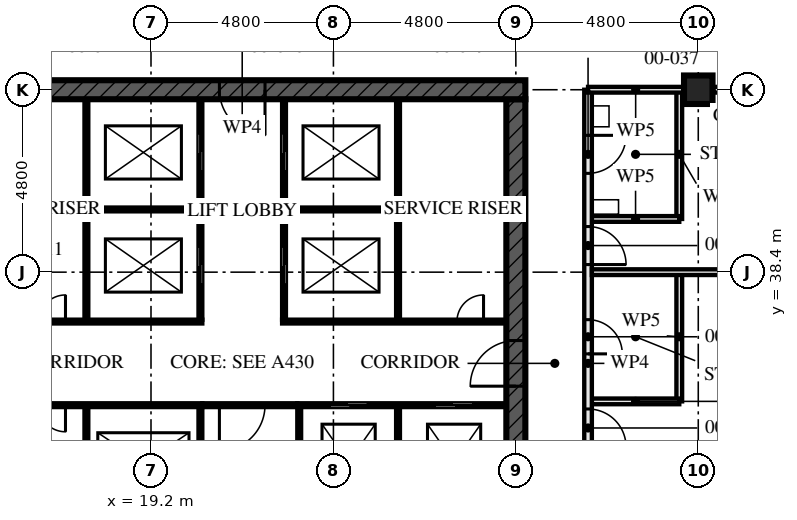
"""IFC4 building model, lengths in metres.
Left out: names, types, materials, properties, quantities, classifications, styles, units other than length and angle.
Written with IfcOpenShell. Run it as: python <this file> out.ifc"""

import sys

from ifc_helpers import new_model, si_unit, direction, frame, frame_2d, origin, origin_2d, place, context, subcontext, project, spatial, rectangle, hollow_rectangle, extrude, element, fill, save


model = new_model("IFC4")
c1 = context("Model", 3, precision=1e-05, world=origin(), true_north=direction((0.0, 1.0)))
c2 = subcontext(c1, "Body", "Model", "MODEL_VIEW")
j1 = project(units=[si_unit("LENGTHUNIT", "METRE"), si_unit("PLANEANGLEUNIT", "RADIAN")], contexts=[c1])
p1 = place(None, origin())
s1 = spatial("IfcSite", under=j1, at=p1, CompositionType="ELEMENT")
p2 = place(p1, origin())
s2 = spatial("IfcBuilding", under=s1, at=p2, CompositionType="ELEMENT")
p3 = place(p2, origin())
s3 = spatial("IfcBuildingStorey", under=s2, at=p3, CompositionType="ELEMENT", Elevation=0.0)
p4 = place(p3, frame((33.6, 43.2, 0.0), z_axis=(0.0, 0.0, 1.0), x_axis=(0.0, 1.0, 0.0)))
e1 = element("IfcColumn", 1, at=p4, inside=s3, PredefinedType="COLUMN", context=c2, shape_type="SweptSolid", body=[
    extrude(hollow_rectangle(XDim=0.75, YDim=0.75, WallThickness=0.08, at=origin_2d()), origin(), (0.0, 0.0, 1.0), 4.5),
])
p5 = place(p3, frame((29.05, 43.2, -1.8), z_axis=(0.0, 0.0, 1.0), x_axis=(-1.0, 0.0, 0.0)))
e2 = element("IfcWall", 2, at=p5, inside=s3, PredefinedType="SHEAR", context=c2, shape_type="SweptSolid", body=[
    extrude(rectangle(XDim=14.9, YDim=0.5, at=frame_2d((7.45, 0.0))), origin(), (0.0, 0.0, 1.0), 6.13),
])
p6 = place(p5, frame((6.85, 0.0, 1.8)))
e3 = element("IfcOpeningElement", 3, at=p6, cuts=e2, PredefinedType="OPENING", context=c2, shape_type="SweptSolid", body=[
    extrude(rectangle(XDim=1.2, YDim=2.1, at=frame_2d((0.6, 1.05))), frame((0.0, 0.26, 0.0), z_axis=(0.0, -1.0, 0.0), x_axis=(1.0, 0.0, 0.0)), (0.0, 0.0, 1.0), 0.521),
])
p7 = place(p3, frame((28.8, 29.05, -1.8), z_axis=(0.0, 0.0, 1.0), x_axis=(0.0, 1.0, 0.0)))
e4 = element("IfcWall", 4, at=p7, inside=s3, PredefinedType="SHEAR", context=c2, shape_type="SweptSolid", body=[
    extrude(rectangle(XDim=13.9, YDim=0.5, at=frame_2d((6.95, 0.0))), origin(), (0.0, 0.0, 1.0), 6.13),
])
p8 = place(p7, frame((6.35, 0.0, 1.8)))
e5 = element("IfcOpeningElement", 5, at=p8, cuts=e4, PredefinedType="OPENING", context=c2, shape_type="SweptSolid", body=[
    extrude(rectangle(XDim=1.2, YDim=2.1, at=frame_2d((0.6, 1.05))), frame((0.0, 0.26, 0.0), z_axis=(0.0, -1.0, 0.0), x_axis=(1.0, 0.0, 0.0)), (0.0, 0.0, 1.0), 0.521),
])
p9 = place(p3, frame((33.1, 35.0, 0.0), z_axis=(0.0, 0.0, 1.0), x_axis=(-1.0, 0.0, 0.0)))
e6 = element("IfcWall", 6, at=p9, inside=s3, PredefinedType="PARTITIONING", context=c2, shape_type="SweptSolid", body=[
    extrude(rectangle(XDim=2.3, YDim=0.15, at=frame_2d((1.15, 0.0))), origin(), (0.0, 0.0, 1.0), 4.33),
])
p10 = place(p3, frame((33.1, 35.0, 0.0), z_axis=(0.0, 0.0, 1.0), x_axis=(0.0, 1.0, 0.0)))
e7 = element("IfcWall", 7, at=p10, inside=s3, PredefinedType="PARTITIONING", context=c2, shape_type="SweptSolid", body=[
    extrude(rectangle(XDim=3.4, YDim=0.15, at=frame_2d((1.7, 0.0))), origin(), (0.0, 0.0, 1.0), 4.33),
])
p11 = place(p3, frame((33.1, 39.8, 0.0), z_axis=(0.0, 0.0, 1.0), x_axis=(-1.0, 0.0, 0.0)))
e8 = element("IfcWall", 8, at=p11, inside=s3, PredefinedType="PARTITIONING", context=c2, shape_type="SweptSolid", body=[
    extrude(rectangle(XDim=2.3, YDim=0.15, at=frame_2d((1.15, 0.0))), origin(), (0.0, 0.0, 1.0), 4.33),
])
p12 = place(p3, frame((33.1, 39.8, 0.0), z_axis=(0.0, 0.0, 1.0), x_axis=(0.0, 1.0, 0.0)))
e9 = element("IfcWall", 9, at=p12, inside=s3, PredefinedType="PARTITIONING", context=c2, shape_type="SweptSolid", body=[
    extrude(rectangle(XDim=3.4, YDim=0.15, at=frame_2d((1.7, 0.0))), origin(), (0.0, 0.0, 1.0), 4.33),
])
p13 = place(p3, frame((42.805, 38.4, 0.0), z_axis=(0.0, 0.0, 1.0), x_axis=(-1.0, 0.0, 0.0)))
e10 = element("IfcWall", 10, at=p13, inside=s3, PredefinedType="PARTITIONING", context=c2, shape_type="SweptSolid", body=[
    extrude(rectangle(XDim=12.005, YDim=0.15, at=frame_2d((6.002, 0.0))), origin(), (0.0, 0.0, 1.0), 3.55),
])
p14 = place(p3, frame((30.7, 28.8, 0.0), z_axis=(0.0, 0.0, 1.0), x_axis=(0.0, 1.0, 0.0)))
e11 = element("IfcWall", 11, at=p14, inside=s3, PredefinedType="PARTITIONING", context=c2, shape_type="SweptSolid", body=[
    extrude(rectangle(XDim=14.4, YDim=0.2, at=frame_2d((7.2, 0.0))), origin(), (0.0, 0.0, 1.0), 3.55),
])
p15 = place(p14, frame((3.462, 0.0, 0.0)))
e12 = element("IfcOpeningElement", 12, at=p15, cuts=e11, PredefinedType="OPENING", context=c2, shape_type="SweptSolid", body=[
    extrude(rectangle(XDim=1.2, YDim=2.4, at=frame_2d((0.6, 1.2))), frame((0.0, 0.111, 0.0), z_axis=(0.0, -1.0, 0.0), x_axis=(1.0, 0.0, 0.0)), (0.0, 0.0, 1.0), 0.221),
])
p16 = place(p14, frame((5.0, 0.0, 0.0)))
e13 = element("IfcOpeningElement", 13, at=p16, cuts=e11, PredefinedType="OPENING", context=c2, shape_type="SweptSolid", body=[
    extrude(rectangle(XDim=1.0, YDim=2.4, at=frame_2d((0.5, 1.2))), frame((0.0, 0.111, 0.0), z_axis=(0.0, -1.0, 0.0), x_axis=(1.0, 0.0, 0.0)), (0.0, 0.0, 1.0), 0.221),
])
p17 = place(p14, frame((9.8, 0.0, 0.0)))
e14 = element("IfcOpeningElement", 14, at=p17, cuts=e11, PredefinedType="OPENING", context=c2, shape_type="SweptSolid", body=[
    extrude(rectangle(XDim=1.0, YDim=2.4, at=frame_2d((0.5, 1.2))), frame((0.0, 0.111, 0.0), z_axis=(0.0, -1.0, 0.0), x_axis=(1.0, 0.0, 0.0)), (0.0, 0.0, 1.0), 0.221),
])
p18 = place(p14, frame((7.45, 0.0, 0.0)))
e15 = element("IfcOpeningElement", 15, at=p18, cuts=e11, PredefinedType="OPENING", context=c2, shape_type="SweptSolid", body=[
    extrude(rectangle(XDim=0.9, YDim=2.1, at=frame_2d((0.45, 1.05))), frame((0.0, 0.111, 0.0), z_axis=(0.0, -1.0, 0.0), x_axis=(1.0, 0.0, 0.0)), (0.0, 0.0, 1.0), 0.221),
])
p19 = place(p14, frame((12.2, 0.0, 0.0)))
e16 = element("IfcOpeningElement", 16, at=p19, cuts=e11, PredefinedType="OPENING", context=c2, shape_type="SweptSolid", body=[
    extrude(rectangle(XDim=1.0, YDim=2.1, at=frame_2d((0.5, 1.05))), frame((0.0, 0.111, 0.0), z_axis=(0.0, -1.0, 0.0), x_axis=(1.0, 0.0, 0.0)), (0.0, 0.0, 1.0), 0.221),
])
p20 = place(p3, frame((20.5, 29.05, -1.8), z_axis=(0.0, 0.0, 1.0), x_axis=(0.0, 1.0, 0.0)))
e17 = element("IfcWall", 17, at=p20, inside=s3, PredefinedType="SOLIDWALL", context=c2, shape_type="SweptSolid", body=[
    extrude(rectangle(XDim=5.8, YDim=0.1, at=frame_2d((2.9, 0.0))), origin(), (0.0, 0.0, 1.0), 6.13),
])
p21 = place(p20, frame((0.8, 0.0, 1.8)))
e18 = element("IfcOpeningElement", 18, at=p21, cuts=e17, PredefinedType="OPENING", context=c2, shape_type="SweptSolid", body=[
    extrude(rectangle(XDim=1.1, YDim=2.3, at=frame_2d((0.55, 1.15))), frame((0.0, 0.061, 0.0), z_axis=(0.0, -1.0, 0.0), x_axis=(1.0, 0.0, 0.0)), (0.0, 0.0, 1.0), 0.121),
])
p22 = place(p20, frame((3.775, 0.0, 1.8)))
e19 = element("IfcOpeningElement", 19, at=p22, cuts=e17, PredefinedType="OPENING", context=c2, shape_type="SweptSolid", body=[
    extrude(rectangle(XDim=1.1, YDim=2.3, at=frame_2d((0.55, 1.15))), frame((0.0, 0.061, 0.0), z_axis=(0.0, -1.0, 0.0), x_axis=(1.0, 0.0, 0.0)), (0.0, 0.0, 1.0), 0.121),
])
p23 = place(p3, frame((20.5, 37.15, -1.8), z_axis=(0.0, 0.0, 1.0), x_axis=(0.0, 1.0, 0.0)))
e20 = element("IfcWall", 20, at=p23, inside=s3, PredefinedType="SOLIDWALL", context=c2, shape_type="SweptSolid", body=[
    extrude(rectangle(XDim=5.8, YDim=0.1, at=frame_2d((2.9, 0.0))), origin(), (0.0, 0.0, 1.0), 6.13),
])
p24 = place(p23, frame((0.925, 0.0, 1.8)))
e21 = element("IfcOpeningElement", 21, at=p24, cuts=e20, PredefinedType="OPENING", context=c2, shape_type="SweptSolid", body=[
    extrude(rectangle(XDim=1.0, YDim=2.1, at=frame_2d((0.5, 1.05))), frame((0.0, 0.061, 0.0), z_axis=(0.0, -1.0, 0.0), x_axis=(1.0, 0.0, 0.0)), (0.0, 0.0, 1.0), 0.121),
])
p25 = place(p23, frame((3.9, 0.0, 1.8)))
e22 = element("IfcOpeningElement", 22, at=p25, cuts=e20, PredefinedType="OPENING", context=c2, shape_type="SweptSolid", body=[
    extrude(rectangle(XDim=1.0, YDim=2.1, at=frame_2d((0.5, 1.05))), frame((0.0, 0.061, 0.0), z_axis=(0.0, -1.0, 0.0), x_axis=(1.0, 0.0, 0.0)), (0.0, 0.0, 1.0), 0.121),
])
p26 = place(p3, frame((22.7, 37.15, -1.8), z_axis=(0.0, 0.0, 1.0), x_axis=(0.0, 1.0, 0.0)))
e23 = element("IfcWall", 23, at=p26, inside=s3, PredefinedType="SOLIDWALL", context=c2, shape_type="SweptSolid", body=[
    extrude(rectangle(XDim=5.8, YDim=0.1, at=frame_2d((2.9, 0.0))), origin(), (0.0, 0.0, 1.0), 6.13),
])
p27 = place(p26, frame((0.925, 0.0, 1.8)))
e24 = element("IfcOpeningElement", 24, at=p27, cuts=e23, PredefinedType="OPENING", context=c2, shape_type="SweptSolid", body=[
    extrude(rectangle(XDim=1.0, YDim=2.1, at=frame_2d((0.5, 1.05))), frame((0.0, 0.061, 0.0), z_axis=(0.0, -1.0, 0.0), x_axis=(1.0, 0.0, 0.0)), (0.0, 0.0, 1.0), 0.121),
])
p28 = place(p26, frame((3.9, 0.0, 1.8)))
e25 = element("IfcOpeningElement", 25, at=p28, cuts=e23, PredefinedType="OPENING", context=c2, shape_type="SweptSolid", body=[
    extrude(rectangle(XDim=1.0, YDim=2.1, at=frame_2d((0.5, 1.05))), frame((0.0, 0.061, 0.0), z_axis=(0.0, -1.0, 0.0), x_axis=(1.0, 0.0, 0.0)), (0.0, 0.0, 1.0), 0.121),
])
p29 = place(p3, frame((23.1, 29.05, -1.8), z_axis=(0.0, 0.0, 1.0), x_axis=(0.0, 1.0, 0.0)))
e26 = element("IfcWall", 26, at=p29, inside=s3, PredefinedType="SOLIDWALL", context=c2, shape_type="SweptSolid", body=[
    extrude(rectangle(XDim=5.8, YDim=0.1, at=frame_2d((2.9, 0.0))), origin(), (0.0, 0.0, 1.0), 6.13),
])
p30 = place(p29, frame((1.0, 0.0, 1.8)))
e27 = element("IfcOpeningElement", 27, at=p30, cuts=e26, PredefinedType="OPENING", context=c2, shape_type="SweptSolid", body=[
    extrude(rectangle(XDim=0.7, YDim=2.1, at=frame_2d((0.35, 1.05))), frame((0.0, 0.061, 0.0), z_axis=(0.0, -1.0, 0.0), x_axis=(1.0, 0.0, 0.0)), (0.0, 0.0, 1.0), 0.121),
])
p31 = place(p3, frame((14.65, 34.9, -1.8), z_axis=(0.0, 0.0, 1.0), x_axis=(1.0, 0.0, 0.0)))
e28 = element("IfcWall", 28, at=p31, inside=s3, PredefinedType="SOLIDWALL", context=c2, shape_type="SweptSolid", body=[
    extrude(rectangle(XDim=5.9, YDim=0.1, at=frame_2d((2.95, 0.0))), origin(), (0.0, 0.0, 1.0), 6.13),
])
p32 = place(p31, frame((1.6, 0.0, 1.8)))
e29 = element("IfcOpeningElement", 29, at=p32, cuts=e28, PredefinedType="OPENING", context=c2, shape_type="SweptSolid", body=[
    extrude(rectangle(XDim=0.7, YDim=2.1, at=frame_2d((0.35, 1.05))), frame((0.0, 0.061, 0.0), z_axis=(0.0, -1.0, 0.0), x_axis=(1.0, 0.0, 0.0)), (0.0, 0.0, 1.0), 0.121),
])
p33 = place(p3, frame((23.05, 34.9, -1.8), z_axis=(0.0, 0.0, 1.0), x_axis=(1.0, 0.0, 0.0)))
e30 = element("IfcWall", 30, at=p33, inside=s3, PredefinedType="SOLIDWALL", context=c2, shape_type="SweptSolid", body=[
    extrude(rectangle(XDim=5.5, YDim=0.1, at=frame_2d((2.75, 0.0))), origin(), (0.0, 0.0, 1.0), 6.13),
])
p34 = place(p33, frame((0.85, 0.0, 1.8)))
e31 = element("IfcOpeningElement", 31, at=p34, cuts=e30, PredefinedType="OPENING", context=c2, shape_type="SweptSolid", body=[
    extrude(rectangle(XDim=1.0, YDim=2.1, at=frame_2d((0.5, 1.05))), frame((0.0, 0.061, 0.0), z_axis=(0.0, -1.0, 0.0), x_axis=(1.0, 0.0, 0.0)), (0.0, 0.0, 1.0), 0.121),
])
p35 = place(p33, frame((3.625, 0.0, 1.8)))
e32 = element("IfcOpeningElement", 32, at=p35, cuts=e30, PredefinedType="OPENING", context=c2, shape_type="SweptSolid", body=[
    extrude(rectangle(XDim=1.0, YDim=2.1, at=frame_2d((0.5, 1.05))), frame((0.0, 0.061, 0.0), z_axis=(0.0, -1.0, 0.0), x_axis=(1.0, 0.0, 0.0)), (0.0, 0.0, 1.0), 0.121),
])
p36 = place(p3, frame((14.65, 37.1, -1.8), z_axis=(0.0, 0.0, 1.0), x_axis=(1.0, 0.0, 0.0)))
e33 = element("IfcWall", 33, at=p36, inside=s3, PredefinedType="SOLIDWALL", context=c2, shape_type="SweptSolid", body=[
    extrude(rectangle(XDim=5.9, YDim=0.1, at=frame_2d((2.95, 0.0))), origin(), (0.0, 0.0, 1.0), 6.13),
])
p37 = place(p36, frame((1.6, 0.0, 1.8)))
e34 = element("IfcOpeningElement", 34, at=p37, cuts=e33, PredefinedType="OPENING", context=c2, shape_type="SweptSolid", body=[
    extrude(rectangle(XDim=0.7, YDim=2.1, at=frame_2d((0.35, 1.05))), frame((0.0, 0.061, 0.0), z_axis=(0.0, -1.0, 0.0), x_axis=(1.0, 0.0, 0.0)), (0.0, 0.0, 1.0), 0.121),
])
p38 = place(p3, frame((22.65, 37.1, -1.8), z_axis=(0.0, 0.0, 1.0), x_axis=(1.0, 0.0, 0.0)))
e35 = element("IfcWall", 35, at=p38, inside=s3, PredefinedType="SOLIDWALL", context=c2, shape_type="SweptSolid", body=[
    extrude(rectangle(XDim=5.9, YDim=0.1, at=frame_2d((2.95, 0.0))), origin(), (0.0, 0.0, 1.0), 6.13),
])
p39 = place(p38, frame((4.6, 0.0, 1.8)))
e36 = element("IfcOpeningElement", 36, at=p39, cuts=e35, PredefinedType="OPENING", context=c2, shape_type="SweptSolid", body=[
    extrude(rectangle(XDim=0.7, YDim=2.1, at=frame_2d((0.35, 1.05))), frame((0.0, 0.061, 0.0), z_axis=(0.0, -1.0, 0.0), x_axis=(1.0, 0.0, 0.0)), (0.0, 0.0, 1.0), 0.121),
])
p40 = place(p3, frame((20.55, 34.9, -1.8), z_axis=(0.0, 0.0, 1.0), x_axis=(1.0, 0.0, 0.0)))
e37 = element("IfcWall", 37, at=p40, inside=s3, PredefinedType="SOLIDWALL", context=c2, shape_type="SweptSolid", body=[
    extrude(rectangle(XDim=2.5, YDim=0.1, at=frame_2d((1.25, 0.0))), origin(), (0.0, 0.0, 1.0), 6.13),
])
p41 = place(p40, frame((0.45, 0.0, 1.8)))
e38 = element("IfcOpeningElement", 38, at=p41, cuts=e37, PredefinedType="OPENING", context=c2, shape_type="SweptSolid", body=[
    extrude(rectangle(XDim=1.2, YDim=2.1, at=frame_2d((0.6, 1.05))), frame((0.0, 0.061, 0.0), z_axis=(0.0, -1.0, 0.0), x_axis=(1.0, 0.0, 0.0)), (0.0, 0.0, 1.0), 0.121),
])
for number, where, z_axis, x_axis in (
    (39, (17.5, 29.05, -1.8), (0.0, 0.0, 1.0), (0.0, 1.0, 0.0)),
    (40, (17.5, 37.15, -1.8), (0.0, 0.0, 1.0), (0.0, 1.0, 0.0)),
):
    element("IfcWall", number, at=place(p3, frame(where, z_axis=z_axis, x_axis=x_axis)), inside=s3, PredefinedType="SOLIDWALL", context=c2, shape_type="SweptSolid", body=[
        extrude(rectangle(XDim=5.8, YDim=0.1, at=frame_2d((2.9, 0.0))), origin(), (0.0, 0.0, 1.0), 6.13),
    ])
for number, where, z_axis, x_axis in (
    (41, (17.55, 40.05, -1.8), (0.0, 0.0, 1.0), (1.0, 0.0, 0.0)),
    (42, (22.75, 40.05, -1.8), (0.0, 0.0, 1.0), (1.0, 0.0, 0.0)),
):
    element("IfcWall", number, at=place(p3, frame(where, z_axis=z_axis, x_axis=x_axis)), inside=s3, PredefinedType="SOLIDWALL", context=c2, shape_type="SweptSolid", body=[
        extrude(rectangle(XDim=2.9, YDim=0.1, at=frame_2d((1.45, 0.0))), origin(), (0.0, 0.0, 1.0), 6.13),
    ])
p42 = place(p3, frame((25.7, 37.15, -1.8), z_axis=(0.0, 0.0, 1.0), x_axis=(0.0, 1.0, 0.0)))
e43 = element("IfcWall", 43, at=p42, inside=s3, PredefinedType="SOLIDWALL", context=c2, shape_type="SweptSolid", body=[
    extrude(rectangle(XDim=5.8, YDim=0.1, at=frame_2d((2.9, 0.0))), origin(), (0.0, 0.0, 1.0), 6.13),
])
p43 = place(p3, frame((25.7, 31.95, -1.8), z_axis=(0.0, 0.0, 1.0), x_axis=(0.0, 1.0, 0.0)))
e44 = element("IfcWall", 44, at=p43, inside=s3, PredefinedType="SOLIDWALL", context=c2, shape_type="SweptSolid", body=[
    extrude(rectangle(XDim=2.9, YDim=0.1, at=frame_2d((1.45, 0.0))), origin(), (0.0, 0.0, 1.0), 6.13),
])
p44 = place(p3, frame((38.005, 43.2, 0.0), z_axis=(0.0, 0.0, 1.0), x_axis=(-1.0, 0.0, 0.0)))
e45 = element("IfcWall", 45, at=p44, inside=s3, PredefinedType="PARTITIONING", context=c2, shape_type="SweptSolid", body=[
    extrude(rectangle(XDim=4.01, YDim=0.15, at=frame_2d((2.005, 0.0))), origin(), (0.0, 0.0, 1.0), 3.32),
])
p45 = place(p3, frame((33.205, 43.2, 0.0), z_axis=(0.0, 0.0, 1.0), x_axis=(-1.0, 0.0, 0.0)))
e46 = element("IfcWall", 46, at=p45, inside=s3, PredefinedType="PARTITIONING", context=c2, shape_type="SweptSolid", body=[
    extrude(rectangle(XDim=2.505, YDim=0.15, at=frame_2d((1.252, 0.0))), origin(), (0.0, 0.0, 1.0), 3.32),
])
p46 = place(p16, frame((1.0, 0.0, 0.0), z_axis=(0.0, 0.0, 1.0), x_axis=(-1.0, 0.0, 0.0)))
e47 = element("IfcDoor", 47, at=p46, inside=s3, OperationType="SINGLE_SWING_LEFT", PredefinedType="DOOR", context=c2, shape_type="SweptSolid", body=[
    extrude(rectangle(XDim=1.0, YDim=2.4, at=frame_2d((0.5, 1.2))), frame((0.0, 0.027, 0.0), z_axis=(0.0, -1.0, 0.0), x_axis=(1.0, 0.0, 0.0)), (0.0, 0.0, 1.0), 0.054),
])
fill(e13, e47)
p47 = place(p17, frame((1.0, 0.0, 0.0), z_axis=(0.0, 0.0, 1.0), x_axis=(-1.0, 0.0, 0.0)))
e48 = element("IfcDoor", 48, at=p47, inside=s3, OperationType="SINGLE_SWING_LEFT", PredefinedType="DOOR", context=c2, shape_type="SweptSolid", body=[
    extrude(rectangle(XDim=1.0, YDim=2.4, at=frame_2d((0.5, 1.2))), frame((0.0, 0.027, 0.0), z_axis=(0.0, -1.0, 0.0), x_axis=(1.0, 0.0, 0.0)), (0.0, 0.0, 1.0), 0.054),
])
fill(e14, e48)
p48 = place(p18, frame((0.9, 0.0, 0.0), z_axis=(0.0, 0.0, 1.0), x_axis=(-1.0, 0.0, 0.0)))
e49 = element("IfcDoor", 49, at=p48, inside=s3, OperationType="SINGLE_SWING_LEFT", PredefinedType="DOOR", context=c2, shape_type="SweptSolid", body=[
    extrude(rectangle(XDim=0.9, YDim=2.1, at=frame_2d((0.45, 1.05))), frame((0.0, 0.027, 0.0), z_axis=(0.0, -1.0, 0.0), x_axis=(1.0, 0.0, 0.0)), (0.0, 0.0, 1.0), 0.054),
])
fill(e15, e49)
p49 = place(p19, frame((1.0, 0.0, 0.0), z_axis=(0.0, 0.0, 1.0), x_axis=(-1.0, 0.0, 0.0)))
e50 = element("IfcDoor", 50, at=p49, inside=s3, OperationType="SINGLE_SWING_RIGHT", PredefinedType="DOOR", context=c2, shape_type="SweptSolid", body=[
    extrude(rectangle(XDim=1.0, YDim=2.1, at=frame_2d((0.5, 1.05))), frame((0.0, 0.027, 0.0), z_axis=(0.0, -1.0, 0.0), x_axis=(1.0, 0.0, 0.0)), (0.0, 0.0, 1.0), 0.054),
])
fill(e16, e50)
p50 = place(p24, origin())
e51 = element("IfcDoor", 51, at=p50, inside=s3, OperationType="SLIDING_TO_LEFT", PredefinedType="DOOR", context=c2, shape_type="SweptSolid", body=[
    extrude(rectangle(XDim=1.0, YDim=2.1, at=frame_2d((0.5, 1.05))), frame((0.0, 0.05, 0.0), z_axis=(0.0, -1.0, 0.0), x_axis=(1.0, 0.0, 0.0)), (0.0, 0.0, 1.0), 0.1),
])
fill(e21, e51)
p51 = place(p25, origin())
e52 = element("IfcDoor", 52, at=p51, inside=s3, OperationType="SLIDING_TO_LEFT", PredefinedType="DOOR", context=c2, shape_type="SweptSolid", body=[
    extrude(rectangle(XDim=1.0, YDim=2.1, at=frame_2d((0.5, 1.05))), frame((0.0, 0.05, 0.0), z_axis=(0.0, -1.0, 0.0), x_axis=(1.0, 0.0, 0.0)), (0.0, 0.0, 1.0), 0.1),
])
fill(e22, e52)
p52 = place(p27, origin())
e53 = element("IfcDoor", 53, at=p52, inside=s3, OperationType="SLIDING_TO_LEFT", PredefinedType="DOOR", context=c2, shape_type="SweptSolid", body=[
    extrude(rectangle(XDim=1.0, YDim=2.1, at=frame_2d((0.5, 1.05))), frame((0.0, 0.05, 0.0), z_axis=(0.0, -1.0, 0.0), x_axis=(1.0, 0.0, 0.0)), (0.0, 0.0, 1.0), 0.1),
])
fill(e24, e53)
p53 = place(p28, origin())
e54 = element("IfcDoor", 54, at=p53, inside=s3, OperationType="SLIDING_TO_LEFT", PredefinedType="DOOR", context=c2, shape_type="SweptSolid", body=[
    extrude(rectangle(XDim=1.0, YDim=2.1, at=frame_2d((0.5, 1.05))), frame((0.0, 0.05, 0.0), z_axis=(0.0, -1.0, 0.0), x_axis=(1.0, 0.0, 0.0)), (0.0, 0.0, 1.0), 0.1),
])
fill(e25, e54)
p54 = place(p32, frame((0.7, 0.0, 0.0), z_axis=(0.0, 0.0, 1.0), x_axis=(-1.0, 0.0, 0.0)))
e55 = element("IfcDoor", 55, at=p54, inside=s3, OperationType="SINGLE_SWING_RIGHT", PredefinedType="DOOR", context=c2, shape_type="SweptSolid", body=[
    extrude(rectangle(XDim=0.7, YDim=2.1, at=frame_2d((0.35, 1.05))), frame((0.0, 0.027, 0.0), z_axis=(0.0, -1.0, 0.0), x_axis=(1.0, 0.0, 0.0)), (0.0, 0.0, 1.0), 0.054),
])
fill(e29, e55)
p55 = place(p34, origin())
e56 = element("IfcDoor", 56, at=p55, inside=s3, OperationType="SLIDING_TO_LEFT", PredefinedType="DOOR", context=c2, shape_type="SweptSolid", body=[
    extrude(rectangle(XDim=1.0, YDim=2.1, at=frame_2d((0.5, 1.05))), frame((0.0, 0.05, 0.0), z_axis=(0.0, -1.0, 0.0), x_axis=(1.0, 0.0, 0.0)), (0.0, 0.0, 1.0), 0.1),
])
fill(e31, e56)
p56 = place(p35, origin())
e57 = element("IfcDoor", 57, at=p56, inside=s3, OperationType="SLIDING_TO_LEFT", PredefinedType="DOOR", context=c2, shape_type="SweptSolid", body=[
    extrude(rectangle(XDim=1.0, YDim=2.1, at=frame_2d((0.5, 1.05))), frame((0.0, 0.05, 0.0), z_axis=(0.0, -1.0, 0.0), x_axis=(1.0, 0.0, 0.0)), (0.0, 0.0, 1.0), 0.1),
])
fill(e32, e57)
p57 = place(p37, origin())
e58 = element("IfcDoor", 58, at=p57, inside=s3, OperationType="SINGLE_SWING_LEFT", PredefinedType="DOOR", context=c2, shape_type="SweptSolid", body=[
    extrude(rectangle(XDim=0.7, YDim=2.1, at=frame_2d((0.35, 1.05))), frame((0.0, 0.027, 0.0), z_axis=(0.0, -1.0, 0.0), x_axis=(1.0, 0.0, 0.0)), (0.0, 0.0, 1.0), 0.054),
])
fill(e34, e58)
p58 = place(p39, origin())
e59 = element("IfcDoor", 59, at=p58, inside=s3, OperationType="SINGLE_SWING_LEFT", PredefinedType="DOOR", context=c2, shape_type="SweptSolid", body=[
    extrude(rectangle(XDim=0.7, YDim=2.1, at=frame_2d((0.35, 1.05))), frame((0.0, 0.027, 0.0), z_axis=(0.0, -1.0, 0.0), x_axis=(1.0, 0.0, 0.0)), (0.0, 0.0, 1.0), 0.054),
])
fill(e36, e59)
p59 = place(p41, frame((1.2, 0.0, 0.0), z_axis=(0.0, 0.0, 1.0), x_axis=(-1.0, 0.0, 0.0)))
e60 = element("IfcDoor", 60, at=p59, inside=s3, OperationType="SINGLE_SWING_LEFT", PredefinedType="DOOR", context=c2, shape_type="SweptSolid", body=[
    extrude(rectangle(XDim=1.2, YDim=2.1, at=frame_2d((0.6, 1.05))), frame((0.0, 0.027, 0.0), z_axis=(0.0, -1.0, 0.0), x_axis=(1.0, 0.0, 0.0)), (0.0, 0.0, 1.0), 0.054),
])
fill(e38, e60)
p60 = place(p8, origin())
e61 = element("IfcDoor", 61, at=p60, inside=s3, OperationType="SINGLE_SWING_LEFT", PredefinedType="DOOR", context=c2, shape_type="SweptSolid", body=[
    extrude(rectangle(XDim=1.2, YDim=2.1, at=frame_2d((0.6, 1.05))), frame((0.0, 0.027, 0.0), z_axis=(0.0, -1.0, 0.0), x_axis=(1.0, 0.0, 0.0)), (0.0, 0.0, 1.0), 0.054),
])
fill(e5, e61)
p61 = place(p6, origin())
e62 = element("IfcDoor", 62, at=p61, inside=s3, OperationType="SINGLE_SWING_LEFT", PredefinedType="DOOR", context=c2, shape_type="SweptSolid", body=[
    extrude(rectangle(XDim=1.2, YDim=2.1, at=frame_2d((0.6, 1.05))), frame((0.0, 0.027, 0.0), z_axis=(0.0, -1.0, 0.0), x_axis=(1.0, 0.0, 0.0)), (0.0, 0.0, 1.0), 0.054),
])
fill(e3, e62)
save(model, sys.argv[1])
